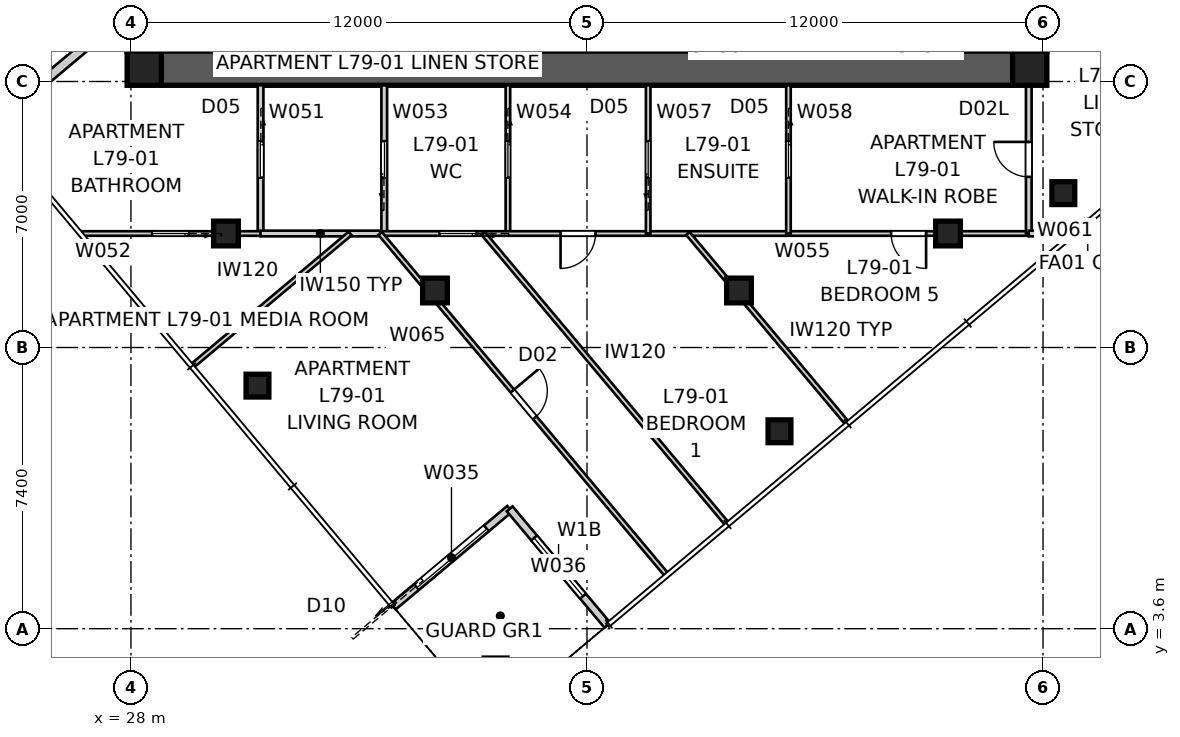
"""IFC4 building model, lengths in metres.
Left out: names, types, materials, properties, quantities, classifications, styles, units other than length and angle.
Written with IfcOpenShell. Run it as: python <this file> out.ifc"""

import sys

from ifc_helpers import new_model, si_unit, direction, frame, frame_2d, origin, origin_2d, place, context, subcontext, project, spatial, polyline, rectangle, outline, extrude, element, fill, save


model = new_model("IFC4")
c1 = context("Model", 3, precision=1e-05, world=origin(), true_north=direction((0.0, 1.0)))
c2 = subcontext(c1, "Body", "Model", "MODEL_VIEW")
j1 = project(units=[si_unit("LENGTHUNIT", "METRE"), si_unit("PLANEANGLEUNIT", "RADIAN")], contexts=[c1])
p1 = place(None, origin())
s1 = spatial("IfcSite", under=j1, at=p1, CompositionType="ELEMENT")
p2 = place(p1, origin())
s2 = spatial("IfcBuilding", under=s1, at=p2, CompositionType="ELEMENT")
p3 = place(p2, frame((0.0, 0.0, 286.2)))
s3 = spatial("IfcBuildingStorey", under=s2, at=p3, CompositionType="ELEMENT", Elevation=286.2)
p4 = place(p3, frame((51.2, 18.35, 0.0), z_axis=(0.0, 0.0, 1.0), x_axis=(-1.0, 0.0, 0.0)))
e1 = element("IfcWall", 1, at=p4, inside=s3, PredefinedType="SHEAR", context=c2, shape_type="SweptSolid", body=[
    extrude(outline(polyline([(0.0, -0.45), (22.4, -0.45), (22.4, -0.025), (22.85, -0.025), (22.85, 0.025), (22.4, 0.025), (22.4, 0.45), (0.0, 0.45), (0.0, 0.025), (-0.45, 0.025), (-0.45, -0.025), (0.0, -0.025), (0.0, -0.45)])), origin(), (0.0, 0.0, 1.0), 3.4),
])
p5 = place(p3, frame((51.65, 18.8, 0.0), z_axis=(0.0, 0.0, 1.0), x_axis=(0.0, 1.0, 0.0)))
e2 = element("IfcWall", 2, at=p5, inside=s3, PredefinedType="SHEAR", context=c2, shape_type="SweptSolid", body=[
    extrude(outline(polyline([(0.0, -0.45), (22.4, -0.45), (22.4, -0.025), (22.85, -0.025), (22.85, 0.025), (22.4, 0.025), (22.4, 0.45), (0.0, 0.45), (0.0, 0.025), (-0.45, 0.025), (-0.45, -0.025), (0.0, -0.025), (0.0, -0.45)])), origin(), (0.0, 0.0, 1.0), 3.4),
])
p6 = place(p5, frame((11.14, 0.0, 0.0)))
e3 = element("IfcOpeningElement", 3, at=p6, cuts=e2, PredefinedType="OPENING", context=c2, shape_type="SweptSolid", body=[
    extrude(rectangle(XDim=1.02, YDim=2.4, at=frame_2d((0.51, 1.2))), frame((0.0, 0.46, 0.0), z_axis=(0.0, -1.0, 0.0), x_axis=(1.0, 0.0, 0.0)), (0.0, 0.0, 1.0), 0.92),
])
p7 = place(p3, frame((28.35, 41.2, 0.0), z_axis=(0.0, 0.0, 1.0), x_axis=(0.0, -1.0, 0.0)))
e4 = element("IfcWall", 4, at=p7, inside=s3, PredefinedType="SHEAR", context=c2, shape_type="SweptSolid", body=[
    extrude(outline(polyline([(0.0, -0.45), (22.4, -0.45), (22.4, -0.025), (22.85, -0.025), (22.85, 0.025), (22.4, 0.025), (22.4, 0.45), (0.0, 0.45), (0.0, 0.025), (-0.45, 0.025), (-0.45, -0.025), (0.0, -0.025), (0.0, -0.45)])), origin(), (0.0, 0.0, 1.0), 3.4),
])
p8 = place(p7, frame((11.14, 0.0, 0.0)))
e5 = element("IfcOpeningElement", 5, at=p8, cuts=e4, PredefinedType="OPENING", context=c2, shape_type="SweptSolid", body=[
    extrude(rectangle(XDim=1.02, YDim=2.4, at=frame_2d((0.51, 1.2))), frame((0.0, 0.46, 0.0), z_axis=(0.0, -1.0, 0.0), x_axis=(1.0, 0.0, 0.0)), (0.0, 0.0, 1.0), 0.92),
])
for number, where, z_axis, x_axis in (
    (6, (28.35, 18.35, 0.0), (0.0, 0.0, 1.0), (1.0, 0.0, 0.0)),
    (7, (51.65, 18.35, 0.0), (0.0, 0.0, 1.0), (1.0, 0.0, 0.0)),
):
    element("IfcColumn", number, at=place(p3, frame(where, z_axis=z_axis, x_axis=x_axis)), inside=s3, PredefinedType="COLUMN", context=c2, shape_type="SweptSolid", body=[
        extrude(rectangle(XDim=0.9, YDim=0.9, at=origin_2d()), origin(), (0.0, 0.0, 1.0), 3.4),
    ])
for number, where, z_axis, x_axis in (
    (8, (45.065, 8.795, 0.0), (0.0, 0.0, 1.0), (1.0, 0.0, 0.0)),
    (9, (52.534, 15.062, 0.0), (0.0, 0.0, 1.0), (1.0, 0.0, 0.0)),
    (10, (31.329, 9.997, 0.0), (0.0, 0.0, 1.0), (1.0, 0.0, 0.0)),
):
    element("IfcColumn", number, at=place(p3, frame(where, z_axis=z_axis, x_axis=x_axis)), inside=s3, PredefinedType="COLUMN", context=c2, shape_type="SweptSolid", body=[
        extrude(rectangle(XDim=0.6, YDim=0.6, at=origin_2d()), origin(), (0.0, 0.0, 1.0), 3.4),
    ])
for number, where, z_axis, x_axis in (
    (11, (30.5, 14.0, 0.0), (0.0, 0.0, 1.0), (1.0, 0.0, 0.0)),
    (12, (36.0, 12.5, 0.0), (0.0, 0.0, 1.0), (1.0, 0.0, 0.0)),
    (13, (44.0, 12.5, 0.0), (0.0, 0.0, 1.0), (1.0, 0.0, 0.0)),
    (14, (49.5, 14.0, 0.0), (0.0, 0.0, 1.0), (1.0, 0.0, 0.0)),
):
    element("IfcColumn", number, at=place(p3, frame(where, z_axis=z_axis, x_axis=x_axis)), inside=s3, PredefinedType="COLUMN", context=c2, shape_type="SweptSolid", body=[
        extrude(rectangle(XDim=0.65, YDim=0.65, at=origin_2d()), origin(), (0.0, 0.0, 1.0), 3.4),
    ])
p9 = place(p3, frame((34.902, 4.183, 0.0), z_axis=(0.0, 0.0, 1.0), x_axis=(0.766060656284, 0.642768287094, 0.0)))
e15 = element("IfcWall", 15, at=p9, inside=s3, PredefinedType="SOLIDWALL", context=c2, shape_type="SweptSolid", body=[
    extrude(rectangle(XDim=4.0, YDim=0.2, at=frame_2d((2.0, 0.0))), origin(), (0.0, 0.0, 1.0), 3.25),
])
p10 = place(p9, frame((0.8, 0.0, 0.0)))
e16 = element("IfcOpeningElement", 16, at=p10, cuts=e15, PredefinedType="OPENING", context=c2, shape_type="SweptSolid", body=[
    extrude(rectangle(XDim=2.4, YDim=2.4, at=frame_2d((1.2, 1.2))), frame((0.0, 0.11, 0.0), z_axis=(0.0, -1.0, 0.0), x_axis=(1.0, 0.0, 0.0)), (0.0, 0.0, 1.0), 0.22),
])
p11 = place(p3, frame((37.966, 6.754, 0.0), z_axis=(0.0, 0.0, 1.0), x_axis=(0.642798342015, -0.766035437498, 0.0)))
e17 = element("IfcWall", 17, at=p11, inside=s3, PredefinedType="SOLIDWALL", context=c2, shape_type="SweptSolid", body=[
    extrude(rectangle(XDim=4.0, YDim=0.2, at=frame_2d((2.0, 0.0))), origin(), (0.0, 0.0, 1.0), 3.25),
])
p12 = place(p11, frame((1.0, 0.0, 0.45)))
e18 = element("IfcOpeningElement", 18, at=p12, cuts=e17, PredefinedType="OPENING", context=c2, shape_type="SweptSolid", body=[
    extrude(rectangle(XDim=2.0, YDim=1.8, at=frame_2d((1.0, 0.9))), frame((0.0, 0.11, 0.0), z_axis=(0.0, -1.0, 0.0), x_axis=(1.0, 0.0, 0.0)), (0.0, 0.0, 1.0), 0.22),
])
p13 = place(p3, frame((24.296, 16.823, 0.0), z_axis=(0.0, 0.0, 1.0), x_axis=(0.76603440109, 0.64279957712, 0.0)))
e19 = element("IfcWall", 19, at=p13, inside=s3, PredefinedType="PARTITIONING", context=c2, shape_type="SweptSolid", body=[
    extrude(rectangle(XDim=4.64, YDim=0.25, at=frame_2d((2.32, 0.0))), origin(), (0.0, 0.0, 1.0), 3.25),
])
p14 = place(p3, frame((31.41, 17.9, 0.0), z_axis=(0.0, 0.0, 1.0), x_axis=(0.0, -1.0, 0.0)))
e20 = element("IfcWall", 20, at=p14, inside=s3, PredefinedType="SOLIDWALL", context=c2, shape_type="SweptSolid", body=[
    extrude(rectangle(XDim=3.9, YDim=0.15, at=frame_2d((1.95, 0.0))), origin(), (0.0, 0.0, 1.0), 3.25),
])
p15 = place(p14, frame((1.47, 0.0, 0.0)))
e21 = element("IfcOpeningElement", 21, at=p15, cuts=e20, PredefinedType="OPENING", context=c2, shape_type="SweptSolid", body=[
    extrude(rectangle(XDim=0.96, YDim=2.1, at=frame_2d((0.48, 1.05))), frame((0.0, 0.085, 0.0), z_axis=(0.0, -1.0, 0.0), x_axis=(1.0, 0.0, 0.0)), (0.0, 0.0, 1.0), 0.17),
])
p16 = place(p3, frame((31.41, 14.0, 0.0), z_axis=(0.0, 0.0, 1.0), x_axis=(-1.0, 0.0, 0.0)))
e22 = element("IfcWall", 22, at=p16, inside=s3, PredefinedType="PARTITIONING", context=c2, shape_type="SweptSolid", body=[
    extrude(rectangle(XDim=4.693, YDim=0.12, at=frame_2d((2.347, 0.0))), origin(), (0.0, 0.0, 1.0), 2.55),
])
p17 = place(p16, frame((1.893, 0.0, 0.0)))
e23 = element("IfcOpeningElement", 23, at=p17, cuts=e22, PredefinedType="OPENING", context=c2, shape_type="SweptSolid", body=[
    extrude(rectangle(XDim=0.96, YDim=2.1, at=frame_2d((0.48, 1.05))), frame((0.0, 0.07, 0.0), z_axis=(0.0, -1.0, 0.0), x_axis=(1.0, 0.0, 0.0)), (0.0, 0.0, 1.0), 0.14),
])
p18 = place(p3, frame((34.665, 14.0, 0.0), z_axis=(0.0, 0.0, 1.0), x_axis=(0.0, 1.0, 0.0)))
e24 = element("IfcWall", 24, at=p18, inside=s3, PredefinedType="SOLIDWALL", context=c2, shape_type="SweptSolid", body=[
    extrude(rectangle(XDim=3.9, YDim=0.15, at=frame_2d((1.95, 0.0))), origin(), (0.0, 0.0, 1.0), 3.25),
])
p19 = place(p18, frame((1.47, 0.0, 0.0)))
e25 = element("IfcOpeningElement", 25, at=p19, cuts=e24, PredefinedType="OPENING", context=c2, shape_type="SweptSolid", body=[
    extrude(rectangle(XDim=0.96, YDim=2.1, at=frame_2d((0.48, 1.05))), frame((0.0, 0.085, 0.0), z_axis=(0.0, -1.0, 0.0), x_axis=(1.0, 0.0, 0.0)), (0.0, 0.0, 1.0), 0.17),
])
p20 = place(p3, frame((37.919, 17.9, 0.0), z_axis=(0.0, 0.0, 1.0), x_axis=(0.0, -1.0, 0.0)))
e26 = element("IfcWall", 26, at=p20, inside=s3, PredefinedType="PARTITIONING", context=c2, shape_type="SweptSolid", body=[
    extrude(rectangle(XDim=3.9, YDim=0.12, at=frame_2d((1.95, 0.0))), origin(), (0.0, 0.0, 1.0), 3.25),
])
p21 = place(p20, frame((1.47, 0.0, 0.0)))
e27 = element("IfcOpeningElement", 27, at=p21, cuts=e26, PredefinedType="OPENING", context=c2, shape_type="SweptSolid", body=[
    extrude(rectangle(XDim=0.96, YDim=2.1, at=frame_2d((0.48, 1.05))), frame((0.0, 0.07, 0.0), z_axis=(0.0, -1.0, 0.0), x_axis=(1.0, 0.0, 0.0)), (0.0, 0.0, 1.0), 0.14),
])
p22 = place(p3, frame((51.625, 14.0, 0.0), z_axis=(0.0, 0.0, 1.0), x_axis=(-1.0, 0.0, 0.0)))
e28 = element("IfcWall", 28, at=p22, inside=s3, PredefinedType="PARTITIONING", context=c2, shape_type="SweptSolid", body=[
    extrude(rectangle(XDim=17.067, YDim=0.12, at=frame_2d((8.533, 0.0))), origin(), (0.0, 0.0, 1.0), 2.55),
])
p23 = place(p22, frame((2.702, 0.0, 0.0)))
e29 = element("IfcOpeningElement", 29, at=p23, cuts=e28, PredefinedType="OPENING", context=c2, shape_type="SweptSolid", body=[
    extrude(rectangle(XDim=0.92, YDim=2.34, at=frame_2d((0.46, 1.17))), frame((0.0, 0.07, 0.0), z_axis=(0.0, -1.0, 0.0), x_axis=(1.0, 0.0, 0.0)), (0.0, 0.0, 1.0), 0.14),
])
p24 = place(p22, frame((11.4, 0.0, 0.0)))
e30 = element("IfcOpeningElement", 30, at=p24, cuts=e28, PredefinedType="OPENING", context=c2, shape_type="SweptSolid", body=[
    extrude(rectangle(XDim=0.92, YDim=2.34, at=frame_2d((0.46, 1.17))), frame((0.0, 0.07, 0.0), z_axis=(0.0, -1.0, 0.0), x_axis=(1.0, 0.0, 0.0)), (0.0, 0.0, 1.0), 0.14),
])
p25 = place(p22, frame((14.544, 0.0, 0.0)))
e31 = element("IfcOpeningElement", 31, at=p25, cuts=e28, PredefinedType="OPENING", context=c2, shape_type="SweptSolid", body=[
    extrude(rectangle(XDim=0.96, YDim=2.1, at=frame_2d((0.48, 1.05))), frame((0.0, 0.07, 0.0), z_axis=(0.0, -1.0, 0.0), x_axis=(1.0, 0.0, 0.0)), (0.0, 0.0, 1.0), 0.14),
])
p26 = place(p3, frame((34.558, 14.0, 0.0), z_axis=(0.0, 0.0, 1.0), x_axis=(-1.0, 0.0, 0.0)))
e32 = element("IfcWall", 32, at=p26, inside=s3, PredefinedType="SOLIDWALL", context=c2, shape_type="SweptSolid", body=[
    extrude(rectangle(XDim=3.147, YDim=0.15, at=frame_2d((1.574, 0.0))), origin(), (0.0, 0.0, 1.0), 3.25),
])
p27 = place(p3, frame((41.61, 14.0, 0.0), z_axis=(0.0, 0.0, 1.0), x_axis=(0.0, 1.0, 0.0)))
e33 = element("IfcWall", 33, at=p27, inside=s3, PredefinedType="PARTITIONING", context=c2, shape_type="SweptSolid", body=[
    extrude(rectangle(XDim=3.9, YDim=0.12, at=frame_2d((1.95, 0.0))), origin(), (0.0, 0.0, 1.0), 3.25),
])
p28 = place(p27, frame((1.47, 0.0, 0.0)))
e34 = element("IfcOpeningElement", 34, at=p28, cuts=e33, PredefinedType="OPENING", context=c2, shape_type="SweptSolid", body=[
    extrude(rectangle(XDim=0.96, YDim=2.1, at=frame_2d((0.48, 1.05))), frame((0.0, 0.07, 0.0), z_axis=(0.0, -1.0, 0.0), x_axis=(1.0, 0.0, 0.0)), (0.0, 0.0, 1.0), 0.14),
])
p29 = place(p3, frame((45.301, 17.9, 0.0), z_axis=(0.0, 0.0, 1.0), x_axis=(0.0, -1.0, 0.0)))
e35 = element("IfcWall", 35, at=p29, inside=s3, PredefinedType="PARTITIONING", context=c2, shape_type="SweptSolid", body=[
    extrude(rectangle(XDim=3.9, YDim=0.12, at=frame_2d((1.95, 0.0))), origin(), (0.0, 0.0, 1.0), 3.25),
])
p30 = place(p29, frame((1.47, 0.0, 0.0)))
e36 = element("IfcOpeningElement", 36, at=p30, cuts=e35, PredefinedType="OPENING", context=c2, shape_type="SweptSolid", body=[
    extrude(rectangle(XDim=0.96, YDim=2.1, at=frame_2d((0.48, 1.05))), frame((0.0, 0.07, 0.0), z_axis=(0.0, -1.0, 0.0), x_axis=(1.0, 0.0, 0.0)), (0.0, 0.0, 1.0), 0.14),
])
p31 = place(p3, frame((51.625, 14.0, 0.0), z_axis=(0.0, 0.0, 1.0), x_axis=(0.0, 1.0, 0.0)))
e37 = element("IfcWall", 37, at=p31, inside=s3, PredefinedType="SOLIDWALL", context=c2, shape_type="SweptSolid", body=[
    extrude(rectangle(XDim=3.9, YDim=0.15, at=frame_2d((1.95, 0.0))), origin(), (0.0, 0.0, 1.0), 3.25),
])
p32 = place(p31, frame((1.49, 0.0, 0.0)))
e38 = element("IfcOpeningElement", 38, at=p32, cuts=e37, PredefinedType="OPENING", context=c2, shape_type="SweptSolid", body=[
    extrude(rectangle(XDim=0.92, YDim=2.1, at=frame_2d((0.46, 1.05))), frame((0.0, 0.085, 0.0), z_axis=(0.0, -1.0, 0.0), x_axis=(1.0, 0.0, 0.0)), (0.0, 0.0, 1.0), 0.17),
])
p33 = place(p3, frame((52.762, 14.0, 0.0), z_axis=(0.0, 0.0, 1.0), x_axis=(-1.0, 0.0, 0.0)))
e39 = element("IfcWall", 39, at=p33, inside=s3, PredefinedType="SOLIDWALL", context=c2, shape_type="SweptSolid", body=[
    extrude(rectangle(XDim=1.137, YDim=0.15, at=frame_2d((0.569, 0.0))), origin(), (0.0, 0.0, 1.0), 3.25),
])
p34 = place(p3, frame((34.558, 14.0, 0.0), z_axis=(0.0, 0.0, 1.0), x_axis=(0.642782931909, -0.766048368216, 0.0)))
e40 = element("IfcWall", 40, at=p34, inside=s3, PredefinedType="PARTITIONING", context=c2, shape_type="SweptSolid", body=[
    extrude(rectangle(XDim=11.701, YDim=0.12, at=frame_2d((5.851, 0.0))), origin(), (0.0, 0.0, 1.0), 3.25),
])
p35 = place(p34, frame((5.411, 0.0, 0.0)))
e41 = element("IfcOpeningElement", 41, at=p35, cuts=e40, PredefinedType="OPENING", context=c2, shape_type="SweptSolid", body=[
    extrude(rectangle(XDim=0.92, YDim=2.34, at=frame_2d((0.46, 1.17))), frame((0.0, 0.07, 0.0), z_axis=(0.0, -1.0, 0.0), x_axis=(1.0, 0.0, 0.0)), (0.0, 0.0, 1.0), 0.14),
])
p36 = place(p3, frame((29.63, 10.529, 0.0), z_axis=(0.0, 0.0, 1.0), x_axis=(0.766034275706, 0.642799726543, 0.0)))
e42 = element("IfcWall", 42, at=p36, inside=s3, PredefinedType="PARTITIONING", context=c2, shape_type="SweptSolid", body=[
    extrude(rectangle(XDim=5.4, YDim=0.12, at=frame_2d((2.7, 0.0))), origin(), (0.0, 0.0, 1.0), 3.25),
])
p37 = place(p3, frame((42.656, 14.0, 0.0), z_axis=(0.0, 0.0, 1.0), x_axis=(0.642779498388, -0.766051249233, 0.0)))
e43 = element("IfcWall", 43, at=p37, inside=s3, PredefinedType="PARTITIONING", context=c2, shape_type="SweptSolid", body=[
    extrude(rectangle(XDim=6.496, YDim=0.12, at=frame_2d((3.248, 0.0))), origin(), (0.0, 0.0, 1.0), 3.25),
])
p38 = place(p3, frame((43.672, 6.372, 0.0), z_axis=(0.0, 0.0, 1.0), x_axis=(-0.64278775678, 0.766044319693, 0.0)))
e44 = element("IfcWall", 44, at=p38, inside=s3, PredefinedType="PARTITIONING", context=c2, shape_type="SweptSolid", body=[
    extrude(rectangle(XDim=9.957, YDim=0.12, at=frame_2d((4.979, 0.0))), origin(), (0.0, 0.0, 1.0), 3.25),
])
p39 = place(p3, frame((51.625, 17.9, 0.0), z_axis=(0.0, 0.0, 1.0), x_axis=(0.027925096799, 0.999610018442, 0.0)))
e45 = element("IfcWall", 45, at=p39, inside=s3, PredefinedType="SOLIDWALL", context=c2, shape_type="SweptSolid", body=[
    extrude(rectangle(XDim=0.9, YDim=0.15, at=frame_2d((0.45, 0.0))), origin(), (0.0, 0.0, 1.0), 3.25),
])
p40 = place(p10, origin())
e46 = element("IfcDoor", 46, at=p40, inside=s3, OperationType="SLIDING_TO_LEFT", PredefinedType="DOOR", context=c2, shape_type="SweptSolid", body=[
    extrude(rectangle(XDim=2.4, YDim=2.4, at=frame_2d((1.2, 1.2))), frame((0.0, 0.025, 0.0), z_axis=(0.0, -1.0, 0.0), x_axis=(1.0, 0.0, 0.0)), (0.0, 0.0, 1.0), 0.05),
])
fill(e16, e46)
p41 = place(p12, origin())
e47 = element("IfcWindow", 47, at=p41, inside=s3, PartitioningType="SINGLE_PANEL", PredefinedType="WINDOW", context=c2, shape_type="SweptSolid", body=[
    extrude(rectangle(XDim=2.0, YDim=1.8, at=frame_2d((1.0, 0.9))), frame((0.0, 0.03, 0.0), z_axis=(0.0, -1.0, 0.0), x_axis=(1.0, 0.0, 0.0)), (0.0, 0.0, 1.0), 0.06),
])
fill(e18, e47)
p42 = place(p32, origin())
e48 = element("IfcDoor", 48, at=p42, inside=s3, OperationType="SINGLE_SWING_RIGHT", PredefinedType="DOOR", context=c2, shape_type="SweptSolid", body=[
    extrude(rectangle(XDim=0.92, YDim=2.1, at=frame_2d((0.46, 1.05))), frame((0.0, 0.025, 0.0), z_axis=(0.0, -1.0, 0.0), x_axis=(1.0, 0.0, 0.0)), (0.0, 0.0, 1.0), 0.05),
])
fill(e38, e48)
p43 = place(p23, origin())
e49 = element("IfcDoor", 49, at=p43, inside=s3, OperationType="SINGLE_SWING_LEFT", PredefinedType="DOOR", context=c2, shape_type="SweptSolid", body=[
    extrude(rectangle(XDim=0.92, YDim=2.34, at=frame_2d((0.46, 1.17))), frame((0.0, 0.025, 0.0), z_axis=(0.0, -1.0, 0.0), x_axis=(1.0, 0.0, 0.0)), (0.0, 0.0, 1.0), 0.05),
])
fill(e29, e49)
p44 = place(p30, origin())
e50 = element("IfcDoor", 50, at=p44, inside=s3, OperationType="SLIDING_TO_LEFT", PredefinedType="DOOR", context=c2, shape_type="SweptSolid", body=[
    extrude(rectangle(XDim=0.96, YDim=2.1, at=frame_2d((0.48, 1.05))), frame((0.0, 0.025, 0.0), z_axis=(0.0, -1.0, 0.0), x_axis=(1.0, 0.0, 0.0)), (0.0, 0.0, 1.0), 0.05),
])
fill(e36, e50)
p45 = place(p28, origin())
e51 = element("IfcDoor", 51, at=p45, inside=s3, OperationType="SLIDING_TO_LEFT", PredefinedType="DOOR", context=c2, shape_type="SweptSolid", body=[
    extrude(rectangle(XDim=0.96, YDim=2.1, at=frame_2d((0.48, 1.05))), frame((0.0, 0.025, 0.0), z_axis=(0.0, -1.0, 0.0), x_axis=(1.0, 0.0, 0.0)), (0.0, 0.0, 1.0), 0.05),
])
fill(e34, e51)
p46 = place(p21, origin())
e52 = element("IfcDoor", 52, at=p46, inside=s3, OperationType="SLIDING_TO_LEFT", PredefinedType="DOOR", context=c2, shape_type="SweptSolid", body=[
    extrude(rectangle(XDim=0.96, YDim=2.1, at=frame_2d((0.48, 1.05))), frame((0.0, 0.025, 0.0), z_axis=(0.0, -1.0, 0.0), x_axis=(1.0, 0.0, 0.0)), (0.0, 0.0, 1.0), 0.05),
])
fill(e27, e52)
p47 = place(p24, origin())
e53 = element("IfcDoor", 53, at=p47, inside=s3, OperationType="SINGLE_SWING_RIGHT", PredefinedType="DOOR", context=c2, shape_type="SweptSolid", body=[
    extrude(rectangle(XDim=0.92, YDim=2.34, at=frame_2d((0.46, 1.17))), frame((0.0, 0.025, 0.0), z_axis=(0.0, -1.0, 0.0), x_axis=(1.0, 0.0, 0.0)), (0.0, 0.0, 1.0), 0.05),
])
fill(e30, e53)
p48 = place(p19, origin())
e54 = element("IfcDoor", 54, at=p48, inside=s3, OperationType="SLIDING_TO_LEFT", PredefinedType="DOOR", context=c2, shape_type="SweptSolid", body=[
    extrude(rectangle(XDim=0.96, YDim=2.1, at=frame_2d((0.48, 1.05))), frame((0.0, 0.025, 0.0), z_axis=(0.0, -1.0, 0.0), x_axis=(1.0, 0.0, 0.0)), (0.0, 0.0, 1.0), 0.05),
])
fill(e25, e54)
p49 = place(p25, origin())
e55 = element("IfcDoor", 55, at=p49, inside=s3, OperationType="SLIDING_TO_LEFT", PredefinedType="DOOR", context=c2, shape_type="SweptSolid", body=[
    extrude(rectangle(XDim=0.96, YDim=2.1, at=frame_2d((0.48, 1.05))), frame((0.0, 0.025, 0.0), z_axis=(0.0, -1.0, 0.0), x_axis=(1.0, 0.0, 0.0)), (0.0, 0.0, 1.0), 0.05),
])
fill(e31, e55)
p50 = place(p15, origin())
e56 = element("IfcDoor", 56, at=p50, inside=s3, OperationType="SLIDING_TO_LEFT", PredefinedType="DOOR", context=c2, shape_type="SweptSolid", body=[
    extrude(rectangle(XDim=0.96, YDim=2.1, at=frame_2d((0.48, 1.05))), frame((0.0, 0.025, 0.0), z_axis=(0.0, -1.0, 0.0), x_axis=(1.0, 0.0, 0.0)), (0.0, 0.0, 1.0), 0.05),
])
fill(e21, e56)
p51 = place(p35, origin())
e57 = element("IfcDoor", 57, at=p51, inside=s3, OperationType="SINGLE_SWING_LEFT", PredefinedType="DOOR", context=c2, shape_type="SweptSolid", body=[
    extrude(rectangle(XDim=0.92, YDim=2.34, at=frame_2d((0.46, 1.17))), frame((0.0, 0.025, 0.0), z_axis=(0.0, -1.0, 0.0), x_axis=(1.0, 0.0, 0.0)), (0.0, 0.0, 1.0), 0.05),
])
fill(e41, e57)
p52 = place(p17, origin())
e58 = element("IfcDoor", 58, at=p52, inside=s3, OperationType="SLIDING_TO_LEFT", PredefinedType="DOOR", context=c2, shape_type="SweptSolid", body=[
    extrude(rectangle(XDim=0.96, YDim=2.1, at=frame_2d((0.48, 1.05))), frame((0.0, 0.025, 0.0), z_axis=(0.0, -1.0, 0.0), x_axis=(1.0, 0.0, 0.0)), (0.0, 0.0, 1.0), 0.05),
])
fill(e23, e58)
save(model, sys.argv[1])
